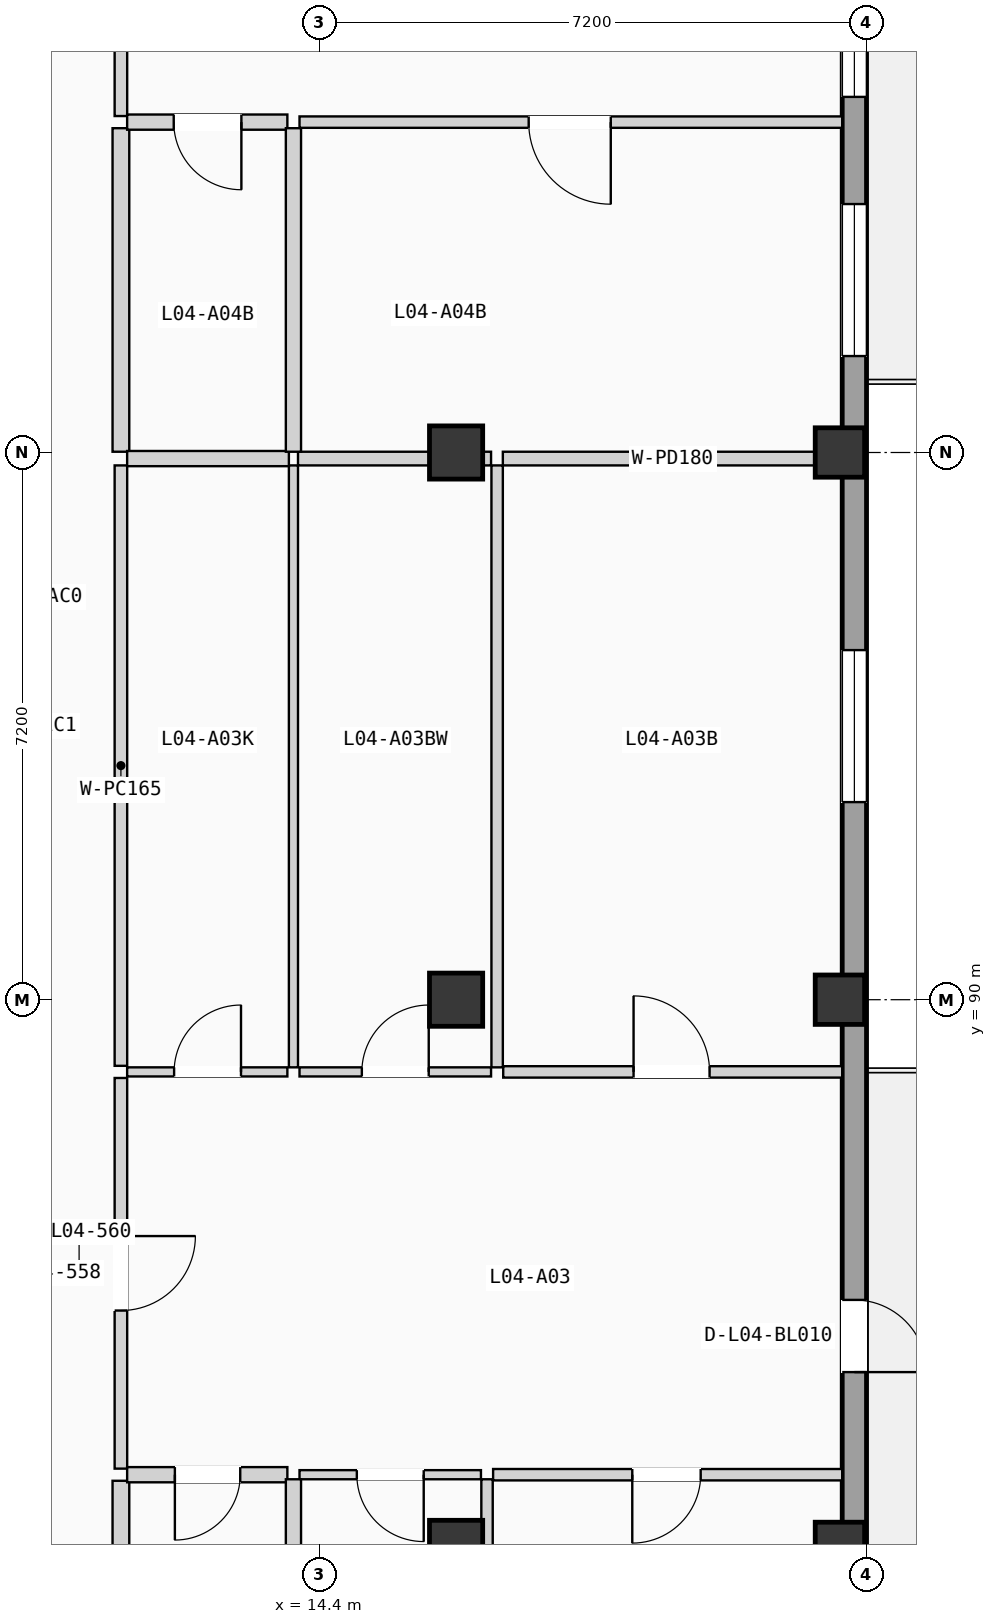
"""IFC4 building model, lengths in metres.
Left out: names, types, materials, properties, quantities, classifications, styles, units other than length and angle.
Written with IfcOpenShell. Run it as: python <this file> out.ifc"""

import sys

from ifc_helpers import new_model, si_unit, direction, frame, frame_2d, origin, origin_2d, place, context, subcontext, project, spatial, rectangle, extrude, element, fill, save


model = new_model("IFC4")
c1 = context("Model", 3, precision=1e-05, world=origin(), true_north=direction((0.0, 1.0)))
c2 = subcontext(c1, "Body", "Model", "MODEL_VIEW")
j1 = project(units=[si_unit("LENGTHUNIT", "METRE"), si_unit("PLANEANGLEUNIT", "RADIAN")], contexts=[c1])
p1 = place(None, origin())
s1 = spatial("IfcSite", under=j1, at=p1, CompositionType="ELEMENT")
p2 = place(p1, origin())
s2 = spatial("IfcBuilding", under=s1, at=p2, CompositionType="ELEMENT")
p3 = place(p2, frame((0.0, 0.0, 15.225)))
s3 = spatial("IfcBuildingStorey", under=s2, at=p3, CompositionType="ELEMENT", Elevation=15.225)
for number, where, z_axis, x_axis in (
    (1, (16.2, 82.8, 0.0), (0.0, 0.0, 1.0), (1.0, 0.0, 0.0)),
    (2, (16.2, 90.0, 0.0), (0.0, 0.0, 1.0), (1.0, 0.0, 0.0)),
    (3, (16.2, 97.2, 0.0), (0.0, 0.0, 1.0), (1.0, 0.0, 0.0)),
):
    element("IfcColumn", number, at=place(p3, frame(where, z_axis=z_axis, x_axis=x_axis)), inside=s3, PredefinedType="COLUMN", context=c2, shape_type="SweptSolid", body=[
        extrude(rectangle(XDim=0.7, YDim=0.7, at=origin_2d()), origin(), (0.0, 0.0, 1.0), 3.15),
    ])
for number, where, z_axis, x_axis in (
    (4, (21.25, 82.8, 0.0), (0.0, 0.0, 1.0), (1.0, 0.0, 0.0)),
    (5, (21.25, 90.0, 0.0), (0.0, 0.0, 1.0), (1.0, 0.0, 0.0)),
    (6, (21.25, 97.2, 0.0), (0.0, 0.0, 1.0), (1.0, 0.0, 0.0)),
):
    element("IfcColumn", number, at=place(p3, frame(where, z_axis=z_axis, x_axis=x_axis)), inside=s3, PredefinedType="COLUMN", context=c2, shape_type="SweptSolid", body=[
        extrude(rectangle(XDim=0.65, YDim=0.65, at=origin_2d()), origin(), (0.0, 0.0, 1.0), 3.15),
    ])
p4 = place(p3, frame((21.44, 68.72, 0.0), z_axis=(0.0, 0.0, 1.0), x_axis=(0.0, 1.0, 0.0)))
e7 = element("IfcWall", 7, at=p4, inside=s3, PredefinedType="SOLIDWALL", context=c2, shape_type="SweptSolid", body=[
    extrude(rectangle(XDim=49.76, YDim=0.32, at=frame_2d((24.88, 0.0))), origin(), (0.0, 0.0, 1.0), 2.89),
])
p5 = place(p4, frame((16.38, 0.0, 0.0)))
e8 = element("IfcOpeningElement", 8, at=p5, cuts=e7, PredefinedType="OPENING", context=c2, shape_type="SweptSolid", body=[
    extrude(rectangle(XDim=0.95, YDim=2.15, at=frame_2d((0.475, 1.075))), frame((0.0, 0.17, 0.0), z_axis=(0.0, -1.0, 0.0), x_axis=(1.0, 0.0, 0.0)), (0.0, 0.0, 1.0), 0.34),
])
p6 = place(p4, frame((10.07, 0.0, 0.85)))
e9 = element("IfcOpeningElement", 9, at=p6, cuts=e7, PredefinedType="OPENING", context=c2, shape_type="SweptSolid", body=[
    extrude(rectangle(XDim=0.95, YDim=1.2, at=frame_2d((0.475, 0.6))), frame((0.0, 0.17, 0.0), z_axis=(0.0, -1.0, 0.0), x_axis=(1.0, 0.0, 0.0)), (0.0, 0.0, 1.0), 0.34),
])
p7 = place(p4, frame((23.88, 0.0, 0.9)))
e10 = element("IfcOpeningElement", 10, at=p7, cuts=e7, PredefinedType="OPENING", context=c2, shape_type="SweptSolid", body=[
    extrude(rectangle(XDim=2.0, YDim=1.2, at=frame_2d((1.0, 0.6))), frame((0.0, 0.17, 0.0), z_axis=(0.0, -1.0, 0.0), x_axis=(1.0, 0.0, 0.0)), (0.0, 0.0, 1.0), 0.34),
])
p8 = place(p4, frame((33.159, 0.0, 0.855)))
e11 = element("IfcOpeningElement", 11, at=p8, cuts=e7, PredefinedType="OPENING", context=c2, shape_type="SweptSolid", body=[
    extrude(rectangle(XDim=2.0, YDim=1.35, at=frame_2d((1.0, 0.675))), frame((0.0, 0.17, 0.0), z_axis=(0.0, -1.0, 0.0), x_axis=(1.0, 0.0, 0.0)), (0.0, 0.0, 1.0), 0.34),
])
p9 = place(p4, frame((29.749, 0.0, 0.705)))
e12 = element("IfcOpeningElement", 12, at=p9, cuts=e7, PredefinedType="OPENING", context=c2, shape_type="SweptSolid", body=[
    extrude(rectangle(XDim=2.0, YDim=1.5, at=frame_2d((1.0, 0.75))), frame((0.0, 0.17, 0.0), z_axis=(0.0, -1.0, 0.0), x_axis=(1.0, 0.0, 0.0)), (0.0, 0.0, 1.0), 0.34),
])
p10 = place(p4, frame((38.636, 0.0, 0.0)))
e13 = element("IfcOpeningElement", 13, at=p10, cuts=e7, PredefinedType="OPENING", context=c2, shape_type="SweptSolid", body=[
    extrude(rectangle(XDim=1.08, YDim=2.18, at=frame_2d((0.54, 1.09))), frame((0.0, 0.17, 0.0), z_axis=(0.0, -1.0, 0.0), x_axis=(1.0, 0.0, 0.0)), (0.0, 0.0, 1.0), 0.34),
])
p11 = place(p3, frame((11.79, 83.83, 0.0), z_axis=(0.0, 0.0, 1.0), x_axis=(0.0, 1.0, 0.0)))
e14 = element("IfcWall", 14, at=p11, inside=s3, PredefinedType="PARTITIONING", context=c2, shape_type="SweptSolid", body=[
    extrude(rectangle(XDim=5.14, YDim=0.165, at=frame_2d((2.57, 0.0))), origin(), (0.0, 0.0, 1.0), 2.87),
])
p12 = place(p11, frame((2.08, 0.0, 0.0)))
e15 = element("IfcOpeningElement", 15, at=p12, cuts=e14, PredefinedType="OPENING", context=c2, shape_type="SweptSolid", body=[
    extrude(rectangle(XDim=0.98, YDim=2.08, at=frame_2d((0.49, 1.04))), frame((0.0, 0.093, 0.0), z_axis=(0.0, -1.0, 0.0), x_axis=(1.0, 0.0, 0.0)), (0.0, 0.0, 1.0), 0.185),
])
p13 = place(p3, frame((11.79, 75.975, 0.0), z_axis=(0.0, 0.0, 1.0), x_axis=(0.0, 1.0, 0.0)))
e16 = element("IfcWall", 16, at=p13, inside=s3, PredefinedType="PLUMBINGWALL", context=c2, shape_type="SweptSolid", body=[
    extrude(rectangle(XDim=7.695, YDim=0.22, at=frame_2d((3.847, 0.0))), origin(), (0.0, 0.0, 1.0), 2.87),
])
p14 = place(p3, frame((11.79, 89.13, 0.0), z_axis=(0.0, 0.0, 1.0), x_axis=(0.0, 1.0, 0.0)))
e17 = element("IfcWall", 17, at=p14, inside=s3, PredefinedType="PARTITIONING", context=c2, shape_type="SweptSolid", body=[
    extrude(rectangle(XDim=7.9, YDim=0.165, at=frame_2d((3.95, 0.0))), origin(), (0.0, 0.0, 1.0), 2.87),
])
p15 = place(p3, frame((11.79, 101.627, 0.0), z_axis=(0.0, 0.0, 1.0), x_axis=(0.0, 1.0, 0.0)))
e18 = element("IfcWall", 18, at=p15, inside=s3, PredefinedType="PARTITIONING", context=c2, shape_type="SweptSolid", body=[
    extrude(rectangle(XDim=5.156, YDim=0.165, at=frame_2d((2.578, 0.0))), origin(), (0.0, 0.0, 1.0), 2.87),
])
p16 = place(p15, frame((2.088, 0.0, 0.0)))
e19 = element("IfcOpeningElement", 19, at=p16, cuts=e18, PredefinedType="OPENING", context=c2, shape_type="SweptSolid", body=[
    extrude(rectangle(XDim=0.98, YDim=2.08, at=frame_2d((0.49, 1.04))), frame((0.0, 0.093, 0.0), z_axis=(0.0, -1.0, 0.0), x_axis=(1.0, 0.0, 0.0)), (0.0, 0.0, 1.0), 0.185),
])
p17 = place(p3, frame((11.79, 97.21, 0.0), z_axis=(0.0, 0.0, 1.0), x_axis=(0.0, 1.0, 0.0)))
e20 = element("IfcWall", 20, at=p17, inside=s3, PredefinedType="PLUMBINGWALL", context=c2, shape_type="SweptSolid", body=[
    extrude(rectangle(XDim=4.257, YDim=0.22, at=frame_2d((2.128, 0.0))), origin(), (0.0, 0.0, 1.0), 2.87),
])
p18 = place(p3, frame((11.872, 83.75, 0.0), z_axis=(0.0, 0.0, 1.0), x_axis=(1.0, 0.0, 0.0)))
e21 = element("IfcWall", 21, at=p18, inside=s3, PredefinedType="PLUMBINGWALL", context=c2, shape_type="SweptSolid", body=[
    extrude(rectangle(XDim=2.108, YDim=0.2, at=frame_2d((1.054, 0.0))), origin(), (0.0, 0.0, 1.0), 2.87),
])
p19 = place(p18, frame((0.628, 0.0, 0.0)))
e22 = element("IfcOpeningElement", 22, at=p19, cuts=e21, PredefinedType="OPENING", context=c2, shape_type="SweptSolid", body=[
    extrude(rectangle(XDim=0.86, YDim=2.0, at=frame_2d((0.43, 1.0))), frame((0.0, 0.11, 0.0), z_axis=(0.0, -1.0, 0.0), x_axis=(1.0, 0.0, 0.0)), (0.0, 0.0, 1.0), 0.22),
])
p20 = place(p3, frame((11.872, 89.05, 0.0), z_axis=(0.0, 0.0, 1.0), x_axis=(1.0, 0.0, 0.0)))
e23 = element("IfcWall", 23, at=p20, inside=s3, PredefinedType="PARTITIONING", context=c2, shape_type="SweptSolid", body=[
    extrude(rectangle(XDim=2.108, YDim=0.12, at=frame_2d((1.054, 0.0))), origin(), (0.0, 0.0, 1.0), 2.87),
])
p21 = place(p20, frame((0.618, 0.0, 0.0)))
e24 = element("IfcOpeningElement", 24, at=p21, cuts=e23, PredefinedType="OPENING", context=c2, shape_type="SweptSolid", body=[
    extrude(rectangle(XDim=0.88, YDim=2.02, at=frame_2d((0.44, 1.01))), frame((0.0, 0.07, 0.0), z_axis=(0.0, -1.0, 0.0), x_axis=(1.0, 0.0, 0.0)), (0.0, 0.0, 1.0), 0.14),
])
p22 = place(p3, frame((16.687, 83.75, 0.0), z_axis=(0.0, 0.0, 1.0), x_axis=(1.0, 0.0, 0.0)))
e25 = element("IfcWall", 25, at=p22, inside=s3, PredefinedType="PARTITIONING", context=c2, shape_type="SweptSolid", body=[
    extrude(rectangle(XDim=4.593, YDim=0.15, at=frame_2d((2.296, 0.0))), origin(), (0.0, 0.0, 1.0), 2.87),
])
p23 = place(p22, frame((1.831, 0.0, 0.0)))
e26 = element("IfcOpeningElement", 26, at=p23, cuts=e25, PredefinedType="OPENING", context=c2, shape_type="SweptSolid", body=[
    extrude(rectangle(XDim=0.9, YDim=2.04, at=frame_2d((0.45, 1.02))), frame((0.0, 0.085, 0.0), z_axis=(0.0, -1.0, 0.0), x_axis=(1.0, 0.0, 0.0)), (0.0, 0.0, 1.0), 0.17),
])
p24 = place(p3, frame((14.14, 83.75, 0.0), z_axis=(0.0, 0.0, 1.0), x_axis=(1.0, 0.0, 0.0)))
e27 = element("IfcWall", 27, at=p24, inside=s3, PredefinedType="PARTITIONING", context=c2, shape_type="SweptSolid", body=[
    extrude(rectangle(XDim=2.387, YDim=0.12, at=frame_2d((1.194, 0.0))), origin(), (0.0, 0.0, 1.0), 2.87),
])
p25 = place(p24, frame((0.754, 0.0, 0.0)))
e28 = element("IfcOpeningElement", 28, at=p25, cuts=e27, PredefinedType="OPENING", context=c2, shape_type="SweptSolid", body=[
    extrude(rectangle(XDim=0.88, YDim=2.02, at=frame_2d((0.44, 1.01))), frame((0.0, 0.07, 0.0), z_axis=(0.0, -1.0, 0.0), x_axis=(1.0, 0.0, 0.0)), (0.0, 0.0, 1.0), 0.14),
])
p26 = place(p3, frame((16.82, 89.05, 0.0), z_axis=(0.0, 0.0, 1.0), x_axis=(1.0, 0.0, 0.0)))
e29 = element("IfcWall", 29, at=p26, inside=s3, PredefinedType="PARTITIONING", context=c2, shape_type="SweptSolid", body=[
    extrude(rectangle(XDim=4.46, YDim=0.15, at=frame_2d((2.23, 0.0))), origin(), (0.0, 0.0, 1.0), 2.87),
])
p27 = place(p26, frame((1.715, 0.0, 0.0)))
e30 = element("IfcOpeningElement", 30, at=p27, cuts=e29, PredefinedType="OPENING", context=c2, shape_type="SweptSolid", body=[
    extrude(rectangle(XDim=1.0, YDim=2.06, at=frame_2d((0.5, 1.03))), frame((0.0, 0.085, 0.0), z_axis=(0.0, -1.0, 0.0), x_axis=(1.0, 0.0, 0.0)), (0.0, 0.0, 1.0), 0.17),
])
p28 = place(p3, frame((14.14, 89.05, 0.0), z_axis=(0.0, 0.0, 1.0), x_axis=(1.0, 0.0, 0.0)))
e31 = element("IfcWall", 31, at=p28, inside=s3, PredefinedType="PARTITIONING", context=c2, shape_type="SweptSolid", body=[
    extrude(rectangle(XDim=2.52, YDim=0.12, at=frame_2d((1.26, 0.0))), origin(), (0.0, 0.0, 1.0), 2.87),
])
p29 = place(p28, frame((0.82, 0.0, 0.0)))
e32 = element("IfcOpeningElement", 32, at=p29, cuts=e31, PredefinedType="OPENING", context=c2, shape_type="SweptSolid", body=[
    extrude(rectangle(XDim=0.88, YDim=2.02, at=frame_2d((0.44, 1.01))), frame((0.0, 0.07, 0.0), z_axis=(0.0, -1.0, 0.0), x_axis=(1.0, 0.0, 0.0)), (0.0, 0.0, 1.0), 0.14),
])
p30 = place(p3, frame((14.06, 75.975, 0.0), z_axis=(0.0, 0.0, 1.0), x_axis=(0.0, 1.0, 0.0)))
e33 = element("IfcWall", 33, at=p30, inside=s3, PredefinedType="PLUMBINGWALL", context=c2, shape_type="SweptSolid", body=[
    extrude(rectangle(XDim=7.715, YDim=0.2, at=frame_2d((3.857, 0.0))), origin(), (0.0, 0.0, 1.0), 2.87),
])
p31 = place(p30, frame((3.435, 0.0, 0.0)))
e34 = element("IfcOpeningElement", 34, at=p31, cuts=e33, PredefinedType="OPENING", context=c2, shape_type="SweptSolid", body=[
    extrude(rectangle(XDim=0.85, YDim=2.01, at=frame_2d((0.425, 1.005))), frame((0.0, 0.11, 0.0), z_axis=(0.0, -1.0, 0.0), x_axis=(1.0, 0.0, 0.0)), (0.0, 0.0, 1.0), 0.22),
])
p32 = place(p3, frame((14.06, 89.11, 0.0), z_axis=(0.0, 0.0, 1.0), x_axis=(0.0, 1.0, 0.0)))
e35 = element("IfcWall", 35, at=p32, inside=s3, PredefinedType="PARTITIONING", context=c2, shape_type="SweptSolid", body=[
    extrude(rectangle(XDim=7.92, YDim=0.12, at=frame_2d((3.96, 0.0))), origin(), (0.0, 0.0, 1.0), 2.87),
])
p33 = place(p3, frame((11.872, 97.12, 0.0), z_axis=(0.0, 0.0, 1.0), x_axis=(1.0, 0.0, 0.0)))
e36 = element("IfcWall", 36, at=p33, inside=s3, PredefinedType="PLUMBINGWALL", context=c2, shape_type="SweptSolid", body=[
    extrude(rectangle(XDim=2.128, YDim=0.2, at=frame_2d((1.064, 0.0))), origin(), (0.0, 0.0, 1.0), 2.16),
])
p34 = place(p3, frame((16.607, 76.0, 0.0), z_axis=(0.0, 0.0, 1.0), x_axis=(0.0, 1.0, 0.0)))
e37 = element("IfcWall", 37, at=p34, inside=s3, PredefinedType="PARTITIONING", context=c2, shape_type="SweptSolid", body=[
    extrude(rectangle(XDim=7.69, YDim=0.15, at=frame_2d((3.845, 0.0))), origin(), (0.0, 0.0, 1.0), 2.87),
])
p35 = place(p3, frame((16.74, 89.11, 0.0), z_axis=(0.0, 0.0, 1.0), x_axis=(0.0, 1.0, 0.0)))
e38 = element("IfcWall", 38, at=p35, inside=s3, PredefinedType="PARTITIONING", context=c2, shape_type="SweptSolid", body=[
    extrude(rectangle(XDim=7.92, YDim=0.15, at=frame_2d((3.96, 0.0))), origin(), (0.0, 0.0, 1.0), 2.87),
])
p36 = place(p3, frame((16.815, 97.12, 0.0), z_axis=(0.0, 0.0, 1.0), x_axis=(1.0, 0.0, 0.0)))
e39 = element("IfcWall", 39, at=p36, inside=s3, PredefinedType="PARTITIONING", context=c2, shape_type="SweptSolid", body=[
    extrude(rectangle(XDim=4.465, YDim=0.18, at=frame_2d((2.232, 0.0))), origin(), (0.0, 0.0, 1.0), 2.21),
])
p37 = place(p3, frame((14.12, 97.12, 0.0), z_axis=(0.0, 0.0, 1.0), x_axis=(1.0, 0.0, 0.0)))
e40 = element("IfcWall", 40, at=p37, inside=s3, PredefinedType="PARTITIONING", context=c2, shape_type="SweptSolid", body=[
    extrude(rectangle(XDim=2.54, YDim=0.18, at=frame_2d((1.27, 0.0))), origin(), (0.0, 0.0, 1.0), 2.16),
])
p38 = place(p3, frame((11.872, 101.547, 0.0), z_axis=(0.0, 0.0, 1.0), x_axis=(1.0, 0.0, 0.0)))
e41 = element("IfcWall", 41, at=p38, inside=s3, PredefinedType="PLUMBINGWALL", context=c2, shape_type="SweptSolid", body=[
    extrude(rectangle(XDim=2.108, YDim=0.2, at=frame_2d((1.054, 0.0))), origin(), (0.0, 0.0, 1.0), 2.87),
])
p39 = place(p38, frame((0.613, 0.0, 0.0)))
e42 = element("IfcOpeningElement", 42, at=p39, cuts=e41, PredefinedType="OPENING", context=c2, shape_type="SweptSolid", body=[
    extrude(rectangle(XDim=0.89, YDim=2.03, at=frame_2d((0.445, 1.015))), frame((0.0, 0.11, 0.0), z_axis=(0.0, -1.0, 0.0), x_axis=(1.0, 0.0, 0.0)), (0.0, 0.0, 1.0), 0.22),
])
p40 = place(p3, frame((14.14, 101.547, 0.0), z_axis=(0.0, 0.0, 1.0), x_axis=(1.0, 0.0, 0.0)))
e43 = element("IfcWall", 43, at=p40, inside=s3, PredefinedType="PARTITIONING", context=c2, shape_type="SweptSolid", body=[
    extrude(rectangle(XDim=7.14, YDim=0.15, at=frame_2d((3.57, 0.0))), origin(), (0.0, 0.0, 1.0), 2.87),
])
p41 = place(p40, frame((3.015, 0.0, 0.0)))
e44 = element("IfcOpeningElement", 44, at=p41, cuts=e43, PredefinedType="OPENING", context=c2, shape_type="SweptSolid", body=[
    extrude(rectangle(XDim=1.08, YDim=2.1, at=frame_2d((0.54, 1.05))), frame((0.0, 0.085, 0.0), z_axis=(0.0, -1.0, 0.0), x_axis=(1.0, 0.0, 0.0)), (0.0, 0.0, 1.0), 0.17),
])
p42 = place(p3, frame((14.06, 97.21, 0.0), z_axis=(0.0, 0.0, 1.0), x_axis=(0.0, 1.0, 0.0)))
e45 = element("IfcWall", 45, at=p42, inside=s3, PredefinedType="PLUMBINGWALL", context=c2, shape_type="SweptSolid", body=[
    extrude(rectangle(XDim=4.257, YDim=0.2, at=frame_2d((2.128, 0.0))), origin(), (0.0, 0.0, 1.0), 2.87),
])
p43 = place(p5, frame((0.95, 0.0, 0.0), z_axis=(0.0, 0.0, 1.0), x_axis=(-1.0, 0.0, 0.0)))
e46 = element("IfcDoor", 46, at=p43, inside=s3, OperationType="SINGLE_SWING_LEFT", PredefinedType="DOOR", context=c2, shape_type="SweptSolid", body=[
    extrude(rectangle(XDim=0.95, YDim=2.15, at=frame_2d((0.475, 1.075))), frame((0.0, 0.025, 0.0), z_axis=(0.0, -1.0, 0.0), x_axis=(1.0, 0.0, 0.0)), (0.0, 0.0, 1.0), 0.05),
])
fill(e8, e46)
p44 = place(p7, origin())
e47 = element("IfcWindow", 47, at=p44, inside=s3, PartitioningType="DOUBLE_PANEL_VERTICAL", PredefinedType="WINDOW", context=c2, shape_type="SweptSolid", body=[
    extrude(rectangle(XDim=2.0, YDim=1.2, at=frame_2d((1.0, 0.6))), frame((0.0, 0.03, 0.0), z_axis=(0.0, -1.0, 0.0), x_axis=(1.0, 0.0, 0.0)), (0.0, 0.0, 1.0), 0.06),
])
fill(e10, e47)
p45 = place(p8, origin())
e48 = element("IfcWindow", 48, at=p45, inside=s3, PartitioningType="DOUBLE_PANEL_VERTICAL", PredefinedType="WINDOW", context=c2, shape_type="SweptSolid", body=[
    extrude(rectangle(XDim=2.0, YDim=1.35, at=frame_2d((1.0, 0.675))), frame((0.0, 0.03, 0.0), z_axis=(0.0, -1.0, 0.0), x_axis=(1.0, 0.0, 0.0)), (0.0, 0.0, 1.0), 0.06),
])
fill(e11, e48)
p46 = place(p9, origin())
e49 = element("IfcWindow", 49, at=p46, inside=s3, PartitioningType="DOUBLE_PANEL_VERTICAL", PredefinedType="WINDOW", context=c2, shape_type="SweptSolid", body=[
    extrude(rectangle(XDim=2.0, YDim=1.5, at=frame_2d((1.0, 0.75))), frame((0.0, 0.03, 0.0), z_axis=(0.0, -1.0, 0.0), x_axis=(1.0, 0.0, 0.0)), (0.0, 0.0, 1.0), 0.06),
])
fill(e12, e49)
p47 = place(p12, frame((0.98, 0.0, 0.0), z_axis=(0.0, 0.0, 1.0), x_axis=(-1.0, 0.0, 0.0)))
e50 = element("IfcDoor", 50, at=p47, inside=s3, OperationType="SINGLE_SWING_RIGHT", PredefinedType="DOOR", context=c2, shape_type="SweptSolid", body=[
    extrude(rectangle(XDim=0.98, YDim=2.08, at=frame_2d((0.49, 1.04))), frame((0.0, 0.025, 0.0), z_axis=(0.0, -1.0, 0.0), x_axis=(1.0, 0.0, 0.0)), (0.0, 0.0, 1.0), 0.05),
])
fill(e15, e50)
p48 = place(p19, frame((0.86, 0.0, 0.0), z_axis=(0.0, 0.0, 1.0), x_axis=(-1.0, 0.0, 0.0)))
e51 = element("IfcDoor", 51, at=p48, inside=s3, OperationType="SINGLE_SWING_LEFT", PredefinedType="DOOR", context=c2, shape_type="SweptSolid", body=[
    extrude(rectangle(XDim=0.86, YDim=2.0, at=frame_2d((0.43, 1.0))), frame((0.0, 0.025, 0.0), z_axis=(0.0, -1.0, 0.0), x_axis=(1.0, 0.0, 0.0)), (0.0, 0.0, 1.0), 0.05),
])
fill(e22, e51)
p49 = place(p21, origin())
e52 = element("IfcDoor", 52, at=p49, inside=s3, OperationType="SINGLE_SWING_RIGHT", PredefinedType="DOOR", context=c2, shape_type="SweptSolid", body=[
    extrude(rectangle(XDim=0.88, YDim=2.02, at=frame_2d((0.44, 1.01))), frame((0.0, 0.025, 0.0), z_axis=(0.0, -1.0, 0.0), x_axis=(1.0, 0.0, 0.0)), (0.0, 0.0, 1.0), 0.05),
])
fill(e24, e52)
p50 = place(p23, frame((0.9, 0.0, 0.0), z_axis=(0.0, 0.0, 1.0), x_axis=(-1.0, 0.0, 0.0)))
e53 = element("IfcDoor", 53, at=p50, inside=s3, OperationType="SINGLE_SWING_LEFT", PredefinedType="DOOR", context=c2, shape_type="SweptSolid", body=[
    extrude(rectangle(XDim=0.9, YDim=2.04, at=frame_2d((0.45, 1.02))), frame((0.0, 0.025, 0.0), z_axis=(0.0, -1.0, 0.0), x_axis=(1.0, 0.0, 0.0)), (0.0, 0.0, 1.0), 0.05),
])
fill(e26, e53)
p51 = place(p25, frame((0.88, 0.0, 0.0), z_axis=(0.0, 0.0, 1.0), x_axis=(-1.0, 0.0, 0.0)))
e54 = element("IfcDoor", 54, at=p51, inside=s3, OperationType="SINGLE_SWING_RIGHT", PredefinedType="DOOR", context=c2, shape_type="SweptSolid", body=[
    extrude(rectangle(XDim=0.88, YDim=2.02, at=frame_2d((0.44, 1.01))), frame((0.0, 0.025, 0.0), z_axis=(0.0, -1.0, 0.0), x_axis=(1.0, 0.0, 0.0)), (0.0, 0.0, 1.0), 0.05),
])
fill(e28, e54)
p52 = place(p27, origin())
e55 = element("IfcDoor", 55, at=p52, inside=s3, OperationType="SINGLE_SWING_LEFT", PredefinedType="DOOR", context=c2, shape_type="SweptSolid", body=[
    extrude(rectangle(XDim=1.0, YDim=2.06, at=frame_2d((0.5, 1.03))), frame((0.0, 0.025, 0.0), z_axis=(0.0, -1.0, 0.0), x_axis=(1.0, 0.0, 0.0)), (0.0, 0.0, 1.0), 0.05),
])
fill(e30, e55)
p53 = place(p29, origin())
e56 = element("IfcDoor", 56, at=p53, inside=s3, OperationType="SINGLE_SWING_RIGHT", PredefinedType="DOOR", context=c2, shape_type="SweptSolid", body=[
    extrude(rectangle(XDim=0.88, YDim=2.02, at=frame_2d((0.44, 1.01))), frame((0.0, 0.025, 0.0), z_axis=(0.0, -1.0, 0.0), x_axis=(1.0, 0.0, 0.0)), (0.0, 0.0, 1.0), 0.05),
])
fill(e32, e56)
p54 = place(p39, frame((0.89, 0.0, 0.0), z_axis=(0.0, 0.0, 1.0), x_axis=(-1.0, 0.0, 0.0)))
e57 = element("IfcDoor", 57, at=p54, inside=s3, OperationType="SINGLE_SWING_RIGHT", PredefinedType="DOOR", context=c2, shape_type="SweptSolid", body=[
    extrude(rectangle(XDim=0.89, YDim=2.03, at=frame_2d((0.445, 1.015))), frame((0.0, 0.025, 0.0), z_axis=(0.0, -1.0, 0.0), x_axis=(1.0, 0.0, 0.0)), (0.0, 0.0, 1.0), 0.05),
])
fill(e42, e57)
p55 = place(p41, frame((1.08, 0.0, 0.0), z_axis=(0.0, 0.0, 1.0), x_axis=(-1.0, 0.0, 0.0)))
e58 = element("IfcDoor", 58, at=p55, inside=s3, OperationType="SINGLE_SWING_RIGHT", PredefinedType="DOOR", context=c2, shape_type="SweptSolid", body=[
    extrude(rectangle(XDim=1.08, YDim=2.1, at=frame_2d((0.54, 1.05))), frame((0.0, 0.025, 0.0), z_axis=(0.0, -1.0, 0.0), x_axis=(1.0, 0.0, 0.0)), (0.0, 0.0, 1.0), 0.05),
])
fill(e44, e58)
save(model, sys.argv[1])
